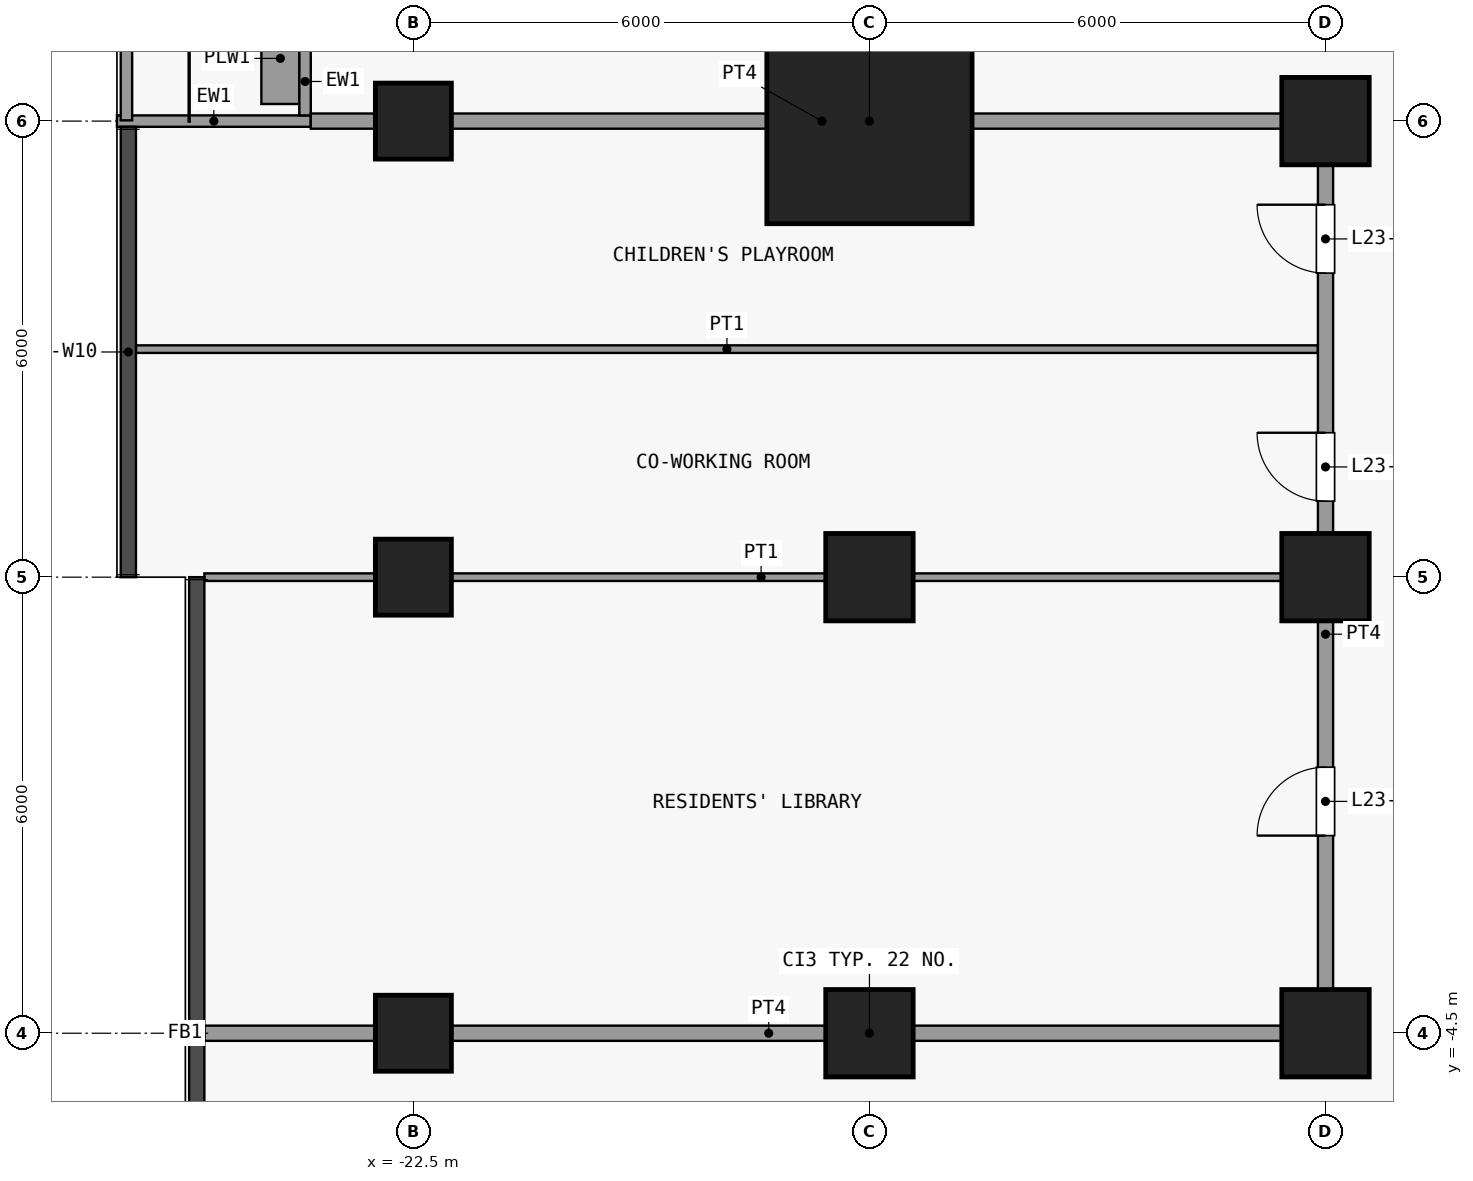
"""IFC4 building model, lengths in metres.
Left out: names, types, materials, properties, quantities, classifications, styles, units other than length and angle.
Written with IfcOpenShell. Run it as: python <this file> out.ifc"""

import sys

from ifc_helpers import new_model, si_unit, direction, frame, frame_2d, origin, origin_2d, place, context, subcontext, project, spatial, rectangle, extrude, element, fill, save


model = new_model("IFC4")
c1 = context("Model", 3, precision=1e-05, world=origin(), true_north=direction((0.0, 1.0)))
c2 = subcontext(c1, "Body", "Model", "MODEL_VIEW")
j1 = project(units=[si_unit("LENGTHUNIT", "METRE"), si_unit("PLANEANGLEUNIT", "RADIAN")], contexts=[c1])
p1 = place(None, origin())
s1 = spatial("IfcSite", under=j1, at=p1, CompositionType="ELEMENT")
p2 = place(p1, origin())
s2 = spatial("IfcBuilding", under=s1, at=p2, CompositionType="ELEMENT")
p3 = place(p2, frame((0.0, 0.0, 95.5)))
s3 = spatial("IfcBuildingStorey", under=s2, at=p3, CompositionType="ELEMENT", Elevation=95.5)
for number, where, z_axis, x_axis in (
    (1, (-22.5, -4.5, 0.0), (0.0, 0.0, 1.0), (1.0, 0.0, 0.0)),
    (2, (-22.5, 1.5, 0.0), (0.0, 0.0, 1.0), (1.0, 0.0, 0.0)),
    (3, (-22.5, 7.5, 0.0), (0.0, 0.0, 1.0), (1.0, 0.0, 0.0)),
):
    element("IfcColumn", number, at=place(p3, frame(where, z_axis=z_axis, x_axis=x_axis)), inside=s3, PredefinedType="COLUMN", context=c2, shape_type="SweptSolid", body=[
        extrude(rectangle(XDim=1.0, YDim=1.0, at=origin_2d()), origin(), (0.0, 0.0, 1.0), 3.6),
    ])
for number, where, z_axis, x_axis in (
    (4, (-16.5, -4.5, 0.0), (0.0, 0.0, 1.0), (1.0, 0.0, 0.0)),
    (5, (-16.5, 1.5, 0.0), (0.0, 0.0, 1.0), (1.0, 0.0, 0.0)),
):
    element("IfcColumn", number, at=place(p3, frame(where, z_axis=z_axis, x_axis=x_axis)), inside=s3, PredefinedType="COLUMN", context=c2, shape_type="SweptSolid", body=[
        extrude(rectangle(XDim=1.15, YDim=1.15, at=origin_2d()), origin(), (0.0, 0.0, 1.0), 3.6),
    ])
p4 = place(p3, frame((-16.5, 7.5, 0.0), z_axis=(0.0, 0.0, 1.0), x_axis=(1.0, 0.0, 0.0)))
e6 = element("IfcColumn", 6, at=p4, inside=s3, PredefinedType="COLUMN", context=c2, shape_type="SweptSolid", body=[
    extrude(rectangle(XDim=2.7, YDim=2.7, at=origin_2d()), origin(), (0.0, 0.0, 1.0), 3.6),
])
for number, where, z_axis, x_axis in (
    (7, (-10.5, -4.5, 0.0), (0.0, 0.0, 1.0), (1.0, 0.0, 0.0)),
    (8, (-10.5, 1.5, 0.0), (0.0, 0.0, 1.0), (1.0, 0.0, 0.0)),
    (9, (-10.5, 7.5, 0.0), (0.0, 0.0, 1.0), (1.0, 0.0, 0.0)),
):
    element("IfcColumn", number, at=place(p3, frame(where, z_axis=z_axis, x_axis=x_axis)), inside=s3, PredefinedType="COLUMN", context=c2, shape_type="SweptSolid", body=[
        extrude(rectangle(XDim=1.15, YDim=1.15, at=origin_2d()), origin(), (0.0, 0.0, 1.0), 3.6),
    ])
p5 = place(p3, frame((-23.85, 7.5, 0.0), z_axis=(0.0, 0.0, 1.0), x_axis=(-1.0, 0.0, 0.0)))
e10 = element("IfcWall", 10, at=p5, inside=s3, PredefinedType="SOLIDWALL", context=c2, shape_type="SweptSolid", body=[
    extrude(rectangle(XDim=2.55, YDim=0.15, at=frame_2d((1.275, 0.0))), origin(), (0.0, 0.0, 1.0), 3.3),
])
p6 = place(p3, frame((-23.925, 7.575, 0.0), z_axis=(0.0, 0.0, 1.0), x_axis=(0.0, 1.0, 0.0)))
e11 = element("IfcWall", 11, at=p6, inside=s3, PredefinedType="SOLIDWALL", context=c2, shape_type="SweptSolid", body=[
    extrude(rectangle(XDim=5.85, YDim=0.15, at=frame_2d((2.925, 0.0))), origin(), (0.0, 0.0, 1.0), 3.3),
])
p7 = place(p6, frame((3.825, 0.0, 0.0)))
e12 = element("IfcOpeningElement", 12, at=p7, cuts=e11, PredefinedType="OPENING", context=c2, shape_type="SweptSolid", body=[
    extrude(rectangle(XDim=1.2, YDim=2.4, at=frame_2d((0.6, 1.2))), frame((0.0, 0.085, 0.0), z_axis=(0.0, -1.0, 0.0), x_axis=(1.0, 0.0, 0.0)), (0.0, 0.0, 1.0), 0.17),
])
p8 = place(p6, frame((1.012, 0.0, 0.9)))
e13 = element("IfcOpeningElement", 13, at=p8, cuts=e11, PredefinedType="OPENING", context=c2, shape_type="SweptSolid", body=[
    extrude(rectangle(XDim=1.8, YDim=2.1, at=frame_2d((0.9, 1.05))), frame((0.0, 0.085, 0.0), z_axis=(0.0, -1.0, 0.0), x_axis=(1.0, 0.0, 0.0)), (0.0, 0.0, 1.0), 0.17),
])
p9 = place(p3, frame((-24.25, 7.725, 0.0), z_axis=(0.0, 0.0, 1.0), x_axis=(0.0, 1.0, 0.0)))
e14 = element("IfcWall", 14, at=p9, inside=s3, PredefinedType="USERDEFINED", context=c2, shape_type="SweptSolid", body=[
    extrude(rectangle(XDim=1.2, YDim=0.5, at=frame_2d((0.6, 0.0))), origin(), (0.0, 0.0, 1.0), 0.9),
])
p10 = place(p3, frame((-26.275, 7.51, 0.0), z_axis=(0.0, 0.0, 1.0), x_axis=(0.0, 1.0, 0.0)))
e15 = element("IfcWall", 15, at=p10, inside=s3, PredefinedType="PARAPET", context=c2, shape_type="SweptSolid", body=[
    extrude(rectangle(XDim=5.94, YDim=0.15, at=frame_2d((2.97, 0.0))), origin(), (0.0, 0.0, 1.0), 1.15),
])
p11 = place(p3, frame((-25.25, -4.5, 0.0), z_axis=(0.0, 0.0, 1.0), x_axis=(1.0, 0.0, 0.0)))
e16 = element("IfcWall", 16, at=p11, inside=s3, PredefinedType="PARTITIONING", context=c2, shape_type="SweptSolid", body=[
    extrude(rectangle(XDim=14.85, YDim=0.2, at=frame_2d((7.425, 0.0))), origin(), (0.0, 0.0, 1.0), 3.3),
])
p12 = place(p3, frame((-25.25, 1.5, 0.0), z_axis=(0.0, 0.0, 1.0), x_axis=(1.0, 0.0, 0.0)))
e17 = element("IfcWall", 17, at=p12, inside=s3, PredefinedType="PARTITIONING", context=c2, shape_type="SweptSolid", body=[
    extrude(rectangle(XDim=14.65, YDim=0.1, at=frame_2d((7.325, 0.0))), origin(), (0.0, 0.0, 1.0), 3.3),
])
p13 = place(p3, frame((-26.15, 4.5, 0.0), z_axis=(0.0, 0.0, 1.0), x_axis=(1.0, 0.0, 0.0)))
e18 = element("IfcWall", 18, at=p13, inside=s3, PredefinedType="PARTITIONING", context=c2, shape_type="SweptSolid", body=[
    extrude(rectangle(XDim=15.55, YDim=0.1, at=frame_2d((7.775, 0.0))), origin(), (0.0, 0.0, 1.0), 3.3),
])
p14 = place(p3, frame((-23.85, 7.5, 0.0), z_axis=(0.0, 0.0, 1.0), x_axis=(1.0, 0.0, 0.0)))
e19 = element("IfcWall", 19, at=p14, inside=s3, PredefinedType="PARTITIONING", context=c2, shape_type="SweptSolid", body=[
    extrude(rectangle(XDim=13.45, YDim=0.2, at=frame_2d((6.725, 0.0))), origin(), (0.0, 0.0, 1.0), 3.3),
])
p15 = place(p3, frame((-10.5, -4.4, 0.0), z_axis=(0.0, 0.0, 1.0), x_axis=(0.0, 1.0, 0.0)))
e20 = element("IfcWall", 20, at=p15, inside=s3, PredefinedType="PARTITIONING", context=c2, shape_type="SweptSolid", body=[
    extrude(rectangle(XDim=11.8, YDim=0.2, at=frame_2d((5.9, 0.0))), origin(), (0.0, 0.0, 1.0), 3.3),
])
p16 = place(p15, frame((2.5, 0.0, 0.0)))
e21 = element("IfcOpeningElement", 21, at=p16, cuts=e20, PredefinedType="OPENING", context=c2, shape_type="SweptSolid", body=[
    extrude(rectangle(XDim=0.9, YDim=2.1, at=frame_2d((0.45, 1.05))), frame((0.0, 0.11, 0.0), z_axis=(0.0, -1.0, 0.0), x_axis=(1.0, 0.0, 0.0)), (0.0, 0.0, 1.0), 0.22),
])
p17 = place(p15, frame((6.9, 0.0, 0.0)))
e22 = element("IfcOpeningElement", 22, at=p17, cuts=e20, PredefinedType="OPENING", context=c2, shape_type="SweptSolid", body=[
    extrude(rectangle(XDim=0.9, YDim=2.1, at=frame_2d((0.45, 1.05))), frame((0.0, 0.11, 0.0), z_axis=(0.0, -1.0, 0.0), x_axis=(1.0, 0.0, 0.0)), (0.0, 0.0, 1.0), 0.22),
])
p18 = place(p15, frame((9.9, 0.0, 0.0)))
e23 = element("IfcOpeningElement", 23, at=p18, cuts=e20, PredefinedType="OPENING", context=c2, shape_type="SweptSolid", body=[
    extrude(rectangle(XDim=0.9, YDim=2.1, at=frame_2d((0.45, 1.05))), frame((0.0, 0.11, 0.0), z_axis=(0.0, -1.0, 0.0), x_axis=(1.0, 0.0, 0.0)), (0.0, 0.0, 1.0), 0.22),
])
p19 = place(p16, origin())
e24 = element("IfcDoor", 24, at=p19, inside=s3, OperationType="SINGLE_SWING_RIGHT", PredefinedType="DOOR", context=c2, shape_type="SweptSolid", body=[
    extrude(rectangle(XDim=0.9, YDim=2.1, at=frame_2d((0.45, 1.05))), frame((0.0, 0.025, 0.0), z_axis=(0.0, -1.0, 0.0), x_axis=(1.0, 0.0, 0.0)), (0.0, 0.0, 1.0), 0.05),
])
fill(e21, e24)
p20 = place(p17, origin())
e25 = element("IfcDoor", 25, at=p20, inside=s3, OperationType="SINGLE_SWING_LEFT", PredefinedType="DOOR", context=c2, shape_type="SweptSolid", body=[
    extrude(rectangle(XDim=0.9, YDim=2.1, at=frame_2d((0.45, 1.05))), frame((0.0, 0.025, 0.0), z_axis=(0.0, -1.0, 0.0), x_axis=(1.0, 0.0, 0.0)), (0.0, 0.0, 1.0), 0.05),
])
fill(e22, e25)
p21 = place(p18, origin())
e26 = element("IfcDoor", 26, at=p21, inside=s3, OperationType="SINGLE_SWING_LEFT", PredefinedType="DOOR", context=c2, shape_type="SweptSolid", body=[
    extrude(rectangle(XDim=0.9, YDim=2.1, at=frame_2d((0.45, 1.05))), frame((0.0, 0.025, 0.0), z_axis=(0.0, -1.0, 0.0), x_axis=(1.0, 0.0, 0.0)), (0.0, 0.0, 1.0), 0.05),
])
fill(e23, e26)
save(model, sys.argv[1])
